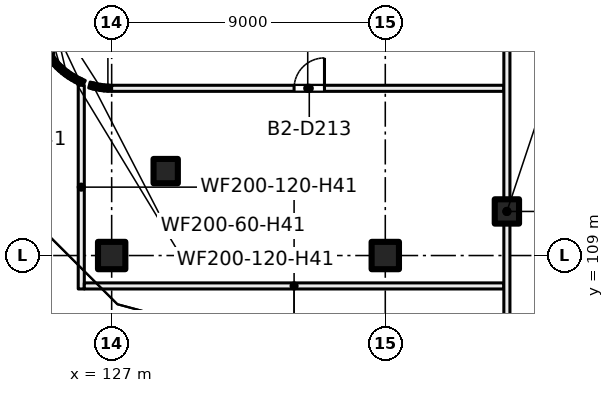
"""IFC4 building model, lengths in metres.
Left out: names, types, materials, properties, quantities, classifications, styles, units other than length and angle.
Written with IfcOpenShell. Run it as: python <this file> out.ifc"""

import sys

from ifc_helpers import new_model, si_unit, direction, frame, frame_2d, origin, origin_2d, place, context, subcontext, project, spatial, rectangle, extrude, element, fill, save


model = new_model("IFC4")
c1 = context("Model", 3, precision=1e-05, world=origin(), true_north=direction((0.0, 1.0)))
c2 = subcontext(c1, "Body", "Model", "MODEL_VIEW")
j1 = project(units=[si_unit("LENGTHUNIT", "METRE"), si_unit("PLANEANGLEUNIT", "RADIAN")], contexts=[c1])
p1 = place(None, origin())
s1 = spatial("IfcSite", under=j1, at=p1, CompositionType="ELEMENT")
p2 = place(p1, origin())
s2 = spatial("IfcBuilding", under=s1, at=p2, CompositionType="ELEMENT")
p3 = place(p2, frame((0.0, 0.0, -9.0)))
s3 = spatial("IfcBuildingStorey", under=s2, at=p3, CompositionType="ELEMENT", Elevation=-9.0)
for number, where, z_axis, x_axis in (
    (1, (127.0, 109.0, 0.0), (0.0, 0.0, 1.0), (1.0, 0.0, 0.0)),
    (2, (136.0, 109.0, 0.0), (0.0, 0.0, 1.0), (1.0, 0.0, 0.0)),
):
    element("IfcColumn", number, at=place(p3, frame(where, z_axis=z_axis, x_axis=x_axis)), inside=s3, PredefinedType="COLUMN", context=c2, shape_type="SweptSolid", body=[
        extrude(rectangle(XDim=0.9, YDim=0.9, at=origin_2d()), origin(), (0.0, 0.0, 1.0), 4.5),
    ])
for number, where, z_axis, x_axis in (
    (3, (128.777, 111.777, 0.0), (0.0, 0.0, 1.0), (1.0, 0.0, 0.0)),
    (4, (140.0, 110.45, 0.0), (0.0, 0.0, 1.0), (1.0, 0.0, 0.0)),
):
    element("IfcColumn", number, at=place(p3, frame(where, z_axis=z_axis, x_axis=x_axis)), inside=s3, PredefinedType="COLUMN", context=c2, shape_type="SweptSolid", body=[
        extrude(rectangle(XDim=0.8, YDim=0.8, at=origin_2d()), origin(), (0.0, 0.0, 1.0), 4.5),
    ])
p4 = place(p3, frame((124.918, 115.615, 0.0), z_axis=(0.0, 0.0, 1.0), x_axis=(0.595707657713, -0.803201336243, 0.0)))
e5 = element("IfcWall", 5, at=p4, inside=s3, PredefinedType="PARTITIONING", context=c2, shape_type="SweptSolid", body=[
    extrude(rectangle(XDim=0.255, YDim=0.2, at=frame_2d((0.128, 0.0))), origin(), (0.0, 0.0, 1.0), 4.125),
])
for number, where, z_axis, x_axis in (
    (6, (125.064, 115.418, 0.0), (0.0, 0.0, 1.0), (0.669, -0.743, 0.0)),
    (7, (125.228, 115.235, 0.0), (0.0, 0.0, 1.0), (0.743, -0.669, 0.0)),
):
    element("IfcWall", number, at=place(p3, frame(where, z_axis=z_axis, x_axis=x_axis)), inside=s3, PredefinedType="PARTITIONING", context=c2, shape_type="SweptSolid", body=[
        extrude(rectangle(XDim=0.256, YDim=0.2, at=frame_2d((0.128, 0.0))), origin(), (0.0, 0.0, 1.0), 4.125),
    ])
p5 = place(p3, frame((125.41, 115.07, 0.0), z_axis=(0.0, 0.0, 1.0), x_axis=(0.803201336243, -0.595707657713, 0.0)))
e8 = element("IfcWall", 8, at=p5, inside=s3, PredefinedType="PARTITIONING", context=c2, shape_type="SweptSolid", body=[
    extrude(rectangle(XDim=0.255, YDim=0.2, at=frame_2d((0.128, 0.0))), origin(), (0.0, 0.0, 1.0), 4.125),
])
p6 = place(p3, frame((125.607, 114.924, 0.0), z_axis=(0.0, 0.0, 1.0), x_axis=(0.857998903579, -0.513651517527, 0.0)))
e9 = element("IfcWall", 9, at=p6, inside=s3, PredefinedType="PARTITIONING", context=c2, shape_type="SweptSolid", body=[
    extrude(rectangle(XDim=0.255, YDim=0.2, at=frame_2d((0.127, 0.0))), origin(), (0.0, 0.0, 1.0), 4.125),
])
p7 = place(p3, frame((125.818, 114.797, 0.0), z_axis=(0.0, 0.0, 1.0), x_axis=(0.902065692634, -0.431598755991, 0.0)))
e10 = element("IfcWall", 10, at=p7, inside=s3, PredefinedType="PARTITIONING", context=c2, shape_type="SweptSolid", body=[
    extrude(rectangle(XDim=0.302, YDim=0.2, at=frame_2d((0.151, 0.0))), origin(), (0.0, 0.0, 1.0), 4.125),
])
p8 = place(p3, frame((126.0, 107.9, 0.0), z_axis=(0.0, 0.0, 1.0), x_axis=(0.0, 1.0, 0.0)))
e11 = element("IfcWall", 11, at=p8, inside=s3, PredefinedType="PARTITIONING", context=c2, shape_type="SweptSolid", body=[
    extrude(rectangle(XDim=6.699, YDim=0.2, at=frame_2d((3.35, 0.0))), origin(), (0.0, 0.0, 1.0), 4.125),
])
p9 = place(p3, frame((126.1, 108.0, 0.0), z_axis=(0.0, 0.0, 1.0), x_axis=(1.0, 0.0, 0.0)))
e12 = element("IfcWall", 12, at=p9, inside=s3, PredefinedType="PARTITIONING", context=c2, shape_type="SweptSolid", body=[
    extrude(rectangle(XDim=13.8, YDim=0.2, at=frame_2d((6.9, 0.0))), origin(), (0.0, 0.0, 1.0), 4.125),
])
p10 = place(p3, frame((126.269, 114.609, 0.0), z_axis=(0.0, 0.0, 1.0), x_axis=(0.970366809683, -0.241636616978, 0.0)))
e13 = element("IfcWall", 13, at=p10, inside=s3, PredefinedType="PARTITIONING", context=c2, shape_type="SweptSolid", body=[
    extrude(rectangle(XDim=0.256, YDim=0.2, at=frame_2d((0.128, 0.0))), origin(), (0.0, 0.0, 1.0), 4.125),
])
p11 = place(p3, frame((126.507, 114.549, 0.0), z_axis=(0.0, 0.0, 1.0), x_axis=(0.988852180426, -0.148900521377, 0.0)))
e14 = element("IfcWall", 14, at=p11, inside=s3, PredefinedType="PARTITIONING", context=c2, shape_type="SweptSolid", body=[
    extrude(rectangle(XDim=0.256, YDim=0.2, at=frame_2d((0.128, 0.0))), origin(), (0.0, 0.0, 1.0), 4.125),
])
p12 = place(p3, frame((126.75, 114.512, 0.0), z_axis=(0.0, 0.0, 1.0), x_axis=(0.998874697667, -0.047427190102, 0.0)))
e15 = element("IfcWall", 15, at=p12, inside=s3, PredefinedType="PARTITIONING", context=c2, shape_type="SweptSolid", body=[
    extrude(rectangle(XDim=0.252, YDim=0.2, at=frame_2d((0.126, 0.0))), origin(), (0.0, 0.0, 1.0), 4.125),
])
p13 = place(p3, frame((139.9, 114.5, 0.0), z_axis=(0.0, 0.0, 1.0), x_axis=(-1.0, 0.0, 0.0)))
e16 = element("IfcWall", 16, at=p13, inside=s3, PredefinedType="PARTITIONING", context=c2, shape_type="SweptSolid", body=[
    extrude(rectangle(XDim=12.902, YDim=0.2, at=frame_2d((6.451, 0.0))), origin(), (0.0, 0.0, 1.0), 4.125),
])
p14 = place(p13, frame((5.9, 0.0, 0.0)))
e17 = element("IfcOpeningElement", 17, at=p14, cuts=e16, PredefinedType="OPENING", context=c2, shape_type="SweptSolid", body=[
    extrude(rectangle(XDim=1.0, YDim=2.1, at=frame_2d((0.5, 1.05))), frame((0.0, 0.11, 0.0), z_axis=(0.0, -1.0, 0.0), x_axis=(1.0, 0.0, 0.0)), (0.0, 0.0, 1.0), 0.22),
])
p15 = place(p3, frame((140.0, 103.9, 0.0), z_axis=(0.0, 0.0, 1.0), x_axis=(0.0, 1.0, 0.0)))
e18 = element("IfcWall", 18, at=p15, inside=s3, PredefinedType="PARTITIONING", context=c2, shape_type="SweptSolid", body=[
    extrude(rectangle(XDim=13.1, YDim=0.2, at=frame_2d((6.55, 0.0))), origin(), (0.0, 0.0, 1.0), 4.125),
])
p16 = place(p14, origin())
e19 = element("IfcDoor", 19, at=p16, inside=s3, OperationType="SINGLE_SWING_LEFT", PredefinedType="DOOR", context=c2, shape_type="SweptSolid", body=[
    extrude(rectangle(XDim=1.0, YDim=2.1, at=frame_2d((0.5, 1.05))), frame((0.0, 0.025, 0.0), z_axis=(0.0, -1.0, 0.0), x_axis=(1.0, 0.0, 0.0)), (0.0, 0.0, 1.0), 0.05),
])
fill(e17, e19)
save(model, sys.argv[1])
